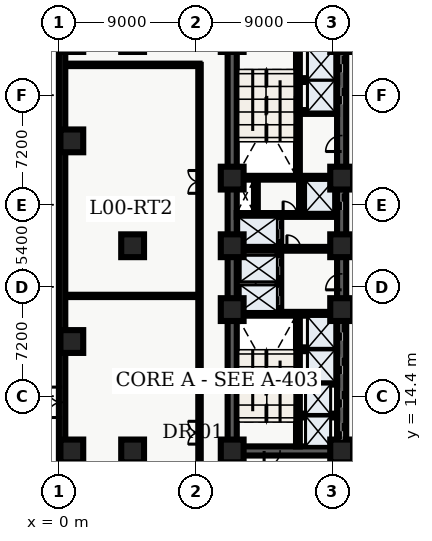
"""IFC4 building model, lengths in metres.
Left out: names, types, materials, properties, quantities, classifications, styles, units other than length and angle.
Written with IfcOpenShell. Run it as: python <this file> out.ifc"""

import sys

from ifc_helpers import new_model, entity, si_unit, converted_unit, direction, frame, origin_with_axes, origin_2d_with_axis, place, context, subcontext, project, spatial, polyline, rectangle, outline, extrude, element, fill, save


model = new_model("IFC4")
c1 = context("Model", 3, precision=1e-05, world=origin_with_axes(), true_north=direction((0.0, 1.0)))
c2 = subcontext(c1, "Body", "Model", "MODEL_VIEW")
j1 = project(units=[si_unit("LENGTHUNIT", "METRE"), converted_unit("PLANEANGLEUNIT", "DEGREE", entity("IfcPlaneAngleMeasure", 0.017), si_unit("PLANEANGLEUNIT", "RADIAN"), dimensions=[0, 0, 0, 0, 0, 0, 0])], contexts=[c1])
p1 = place(None, origin_with_axes())
s1 = spatial("IfcSite", under=j1, at=p1, CompositionType="ELEMENT")
p2 = place(p1, origin_with_axes())
s2 = spatial("IfcBuilding", under=s1, at=p2, CompositionType="ELEMENT")
p3 = place(p2, origin_with_axes())
s3 = spatial("IfcBuildingStorey", under=s2, at=p3, CompositionType="ELEMENT", Elevation=0.0)
p4 = place(p3, frame((11.4, 10.8, 0.0), z_axis=(0.0, 0.0, 1.0), x_axis=(0.0, 1.0, 0.0)))
e1 = element("IfcWall", 1, at=p4, inside=s3, PredefinedType="SHEAR", context=c2, shape_type="SweptSolid", body=[
    extrude(outline(polyline([(0.0, -0.3), (27.0, -0.3), (27.0, 0.3), (0.0, 0.3), (0.0, -0.3)])), origin_with_axes(), (0.0, 0.0, 1.0), 5.46),
])
p5 = place(p3, frame((18.6, 10.8, 0.0), z_axis=(0.0, 0.0, 1.0), x_axis=(-1.0, 0.0, 0.0)))
e2 = element("IfcWall", 2, at=p5, inside=s3, PredefinedType="SHEAR", context=c2, shape_type="SweptSolid", body=[
    extrude(outline(polyline([(0.0, -0.3), (7.2, -0.3), (7.2, 0.3), (0.0, 0.3), (0.0, -0.3)])), origin_with_axes(), (0.0, 0.0, 1.0), 5.46),
])
p6 = place(p5, frame((4.575, 0.0, 0.0), z_axis=(0.0, 0.0, 1.0), x_axis=(1.0, 0.0, 0.0)))
e3 = element("IfcOpeningElement", 3, at=p6, cuts=e2, PredefinedType="OPENING", context=c2, shape_type="SweptSolid", body=[
    extrude(rectangle(XDim=1.05, YDim=0.62, at=origin_2d_with_axis()), origin_with_axes(), (0.0, 0.0, 1.0), 2.15),
])
p7 = place(p3, frame((18.6, 10.8, 0.0), z_axis=(0.0, 0.0, 1.0), x_axis=(0.0, 1.0, 0.0)))
e4 = element("IfcWall", 4, at=p7, inside=s3, PredefinedType="SHEAR", context=c2, shape_type="SweptSolid", body=[
    extrude(outline(polyline([(0.0, -0.3), (13.5, -0.3), (13.5, 0.3), (0.0, 0.3), (0.0, -0.3)])), origin_with_axes(), (0.0, 0.0, 1.0), 5.46),
])
p8 = place(p7, frame((1.3, 0.0, 0.0), z_axis=(0.0, 0.0, 1.0), x_axis=(1.0, 0.0, 0.0)))
e5 = element("IfcOpeningElement", 5, at=p8, cuts=e4, PredefinedType="OPENING", context=c2, shape_type="SweptSolid", body=[
    extrude(rectangle(XDim=1.1, YDim=0.62, at=origin_2d_with_axis()), origin_with_axes(), (0.0, 0.0, 1.0), 2.15),
])
p9 = place(p7, frame((3.4, 0.0, 0.0), z_axis=(0.0, 0.0, 1.0), x_axis=(1.0, 0.0, 0.0)))
e6 = element("IfcOpeningElement", 6, at=p9, cuts=e4, PredefinedType="OPENING", context=c2, shape_type="SweptSolid", body=[
    extrude(rectangle(XDim=1.1, YDim=0.62, at=origin_2d_with_axis()), origin_with_axes(), (0.0, 0.0, 1.0), 2.15),
])
p10 = place(p7, frame((5.6, 0.0, 0.0), z_axis=(0.0, 0.0, 1.0), x_axis=(1.0, 0.0, 0.0)))
e7 = element("IfcOpeningElement", 7, at=p10, cuts=e4, PredefinedType="OPENING", context=c2, shape_type="SweptSolid", body=[
    extrude(rectangle(XDim=1.1, YDim=0.62, at=origin_2d_with_axis()), origin_with_axes(), (0.0, 0.0, 1.0), 2.15),
])
p11 = place(p7, frame((7.8, 0.0, 0.0), z_axis=(0.0, 0.0, 1.0), x_axis=(1.0, 0.0, 0.0)))
e8 = element("IfcOpeningElement", 8, at=p11, cuts=e4, PredefinedType="OPENING", context=c2, shape_type="SweptSolid", body=[
    extrude(rectangle(XDim=1.1, YDim=0.62, at=origin_2d_with_axis()), origin_with_axes(), (0.0, 0.0, 1.0), 2.15),
])
p12 = place(p7, frame((11.125, 0.0, 0.0), z_axis=(0.0, 0.0, 1.0), x_axis=(1.0, 0.0, 0.0)))
e9 = element("IfcOpeningElement", 9, at=p12, cuts=e4, PredefinedType="OPENING", context=c2, shape_type="SweptSolid", body=[
    extrude(rectangle(XDim=1.05, YDim=0.62, at=origin_2d_with_axis()), origin_with_axes(), (0.0, 0.0, 1.0), 2.15),
])
p13 = place(p3, frame((18.6, 24.3, 0.0), z_axis=(0.0, 0.0, 1.0), x_axis=(0.0, 1.0, 0.0)))
e10 = element("IfcWall", 10, at=p13, inside=s3, PredefinedType="SHEAR", context=c2, shape_type="SweptSolid", body=[
    extrude(outline(polyline([(0.0, -0.3), (13.5, -0.3), (13.5, 0.3), (0.0, 0.3), (0.0, -0.3)])), origin_with_axes(), (0.0, 0.0, 1.0), 5.46),
])
p14 = place(p13, frame((9.85, 0.0, 0.0), z_axis=(0.0, 0.0, 1.0), x_axis=(1.0, 0.0, 0.0)))
e11 = element("IfcOpeningElement", 11, at=p14, cuts=e10, PredefinedType="OPENING", context=c2, shape_type="SweptSolid", body=[
    extrude(rectangle(XDim=1.1, YDim=0.62, at=origin_2d_with_axis()), origin_with_axes(), (0.0, 0.0, 1.0), 2.15),
])
p15 = place(p13, frame((11.95, 0.0, 0.0), z_axis=(0.0, 0.0, 1.0), x_axis=(1.0, 0.0, 0.0)))
e12 = element("IfcOpeningElement", 12, at=p15, cuts=e10, PredefinedType="OPENING", context=c2, shape_type="SweptSolid", body=[
    extrude(rectangle(XDim=1.1, YDim=0.62, at=origin_2d_with_axis()), origin_with_axes(), (0.0, 0.0, 1.0), 2.15),
])
p16 = place(p13, frame((2.9, 0.0, 0.0), z_axis=(0.0, 0.0, 1.0), x_axis=(1.0, 0.0, 0.0)))
e13 = element("IfcOpeningElement", 13, at=p16, cuts=e10, PredefinedType="OPENING", context=c2, shape_type="SweptSolid", body=[
    extrude(rectangle(XDim=1.1, YDim=0.62, at=origin_2d_with_axis()), origin_with_axes(), (0.0, 0.0, 1.0), 2.15),
])
p17 = place(p13, frame((6.725, 0.0, 0.0), z_axis=(0.0, 0.0, 1.0), x_axis=(1.0, 0.0, 0.0)))
e14 = element("IfcOpeningElement", 14, at=p17, cuts=e10, PredefinedType="OPENING", context=c2, shape_type="SweptSolid", body=[
    extrude(rectangle(XDim=1.05, YDim=0.62, at=origin_2d_with_axis()), origin_with_axes(), (0.0, 0.0, 1.0), 2.15),
])
p18 = place(p3, frame((15.725, 11.1, 0.0), z_axis=(0.0, 0.0, 1.0), x_axis=(0.0, 1.0, 0.0)))
e15 = element("IfcWall", 15, at=p18, inside=s3, PredefinedType="SHEAR", context=c2, shape_type="SweptSolid", body=[
    extrude(outline(polyline([(0.0, -0.125), (8.6, -0.125), (8.6, 0.125), (0.0, 0.125), (0.0, -0.125)])), origin_with_axes(), (0.0, 0.0, 1.0), 5.46),
])
p19 = place(p3, frame((11.7, 19.825, 0.0), z_axis=(0.0, 0.0, 1.0), x_axis=(1.0, 0.0, 0.0)))
e16 = element("IfcWall", 16, at=p19, inside=s3, PredefinedType="SHEAR", context=c2, shape_type="SweptSolid", body=[
    extrude(outline(polyline([(0.0, -0.125), (6.6, -0.125), (6.6, 0.125), (0.0, 0.125), (0.0, -0.125)])), origin_with_axes(), (0.0, 0.0, 1.0), 5.46),
])
p20 = place(p3, frame((15.725, 28.9, 0.0), z_axis=(0.0, 0.0, 1.0), x_axis=(0.0, 1.0, 0.0)))
e17 = element("IfcWall", 17, at=p20, inside=s3, PredefinedType="SHEAR", context=c2, shape_type="SweptSolid", body=[
    extrude(outline(polyline([(0.0, -0.125), (8.6, -0.125), (8.6, 0.125), (0.0, 0.125), (0.0, -0.125)])), origin_with_axes(), (0.0, 0.0, 1.0), 5.46),
])
p21 = place(p3, frame((11.7, 28.775, 0.0), z_axis=(0.0, 0.0, 1.0), x_axis=(1.0, 0.0, 0.0)))
e18 = element("IfcWall", 18, at=p21, inside=s3, PredefinedType="SHEAR", context=c2, shape_type="SweptSolid", body=[
    extrude(outline(polyline([(0.0, -0.125), (6.6, -0.125), (6.6, 0.125), (0.0, 0.125), (0.0, -0.125)])), origin_with_axes(), (0.0, 0.0, 1.0), 5.46),
])
p22 = place(p3, frame((14.5, 19.95, 0.0), z_axis=(0.0, 0.0, 1.0), x_axis=(0.0, 1.0, 0.0)))
e19 = element("IfcWall", 19, at=p22, inside=s3, PredefinedType="SOLIDWALL", context=c2, shape_type="SweptSolid", body=[
    extrude(outline(polyline([(0.0, -0.125), (6.25, -0.125), (6.25, 0.125), (0.0, 0.125), (0.0, -0.125)])), origin_with_axes(), (0.0, 0.0, 1.0), 3.6),
])
p23 = place(p22, frame((1.025, 0.0, 0.0), z_axis=(0.0, 0.0, 1.0), x_axis=(1.0, 0.0, 0.0)))
e20 = element("IfcOpeningElement", 20, at=p23, cuts=e19, PredefinedType="OPENING", context=c2, shape_type="SweptSolid", body=[
    extrude(rectangle(XDim=1.1, YDim=0.27, at=origin_2d_with_axis()), origin_with_axes(), (0.0, 0.0, 1.0), 2.15),
])
p24 = place(p22, frame((2.975, 0.0, 0.0), z_axis=(0.0, 0.0, 1.0), x_axis=(1.0, 0.0, 0.0)))
e21 = element("IfcOpeningElement", 21, at=p24, cuts=e19, PredefinedType="OPENING", context=c2, shape_type="SweptSolid", body=[
    extrude(rectangle(XDim=1.1, YDim=0.27, at=origin_2d_with_axis()), origin_with_axes(), (0.0, 0.0, 1.0), 2.15),
])
p25 = place(p22, frame((5.425, 0.0, 0.0), z_axis=(0.0, 0.0, 1.0), x_axis=(1.0, 0.0, 0.0)))
e22 = element("IfcOpeningElement", 22, at=p25, cuts=e19, PredefinedType="OPENING", context=c2, shape_type="SweptSolid", body=[
    extrude(rectangle(XDim=1.2, YDim=0.27, at=origin_2d_with_axis()), origin_with_axes(), (0.0, 0.0, 1.0), 2.15),
])
p26 = place(p3, frame((11.7, 24.1, 0.0), z_axis=(0.0, 0.0, 1.0), x_axis=(1.0, 0.0, 0.0)))
e23 = element("IfcWall", 23, at=p26, inside=s3, PredefinedType="SOLIDWALL", context=c2, shape_type="SweptSolid", body=[
    extrude(outline(polyline([(0.0, -0.125), (6.6, -0.125), (6.6, 0.125), (0.0, 0.125), (0.0, -0.125)])), origin_with_axes(), (0.0, 0.0, 1.0), 3.6),
])
p27 = place(p26, frame((3.75, 0.0, 0.0), z_axis=(0.0, 0.0, 1.0), x_axis=(1.0, 0.0, 0.0)))
e24 = element("IfcOpeningElement", 24, at=p27, cuts=e23, PredefinedType="OPENING", context=c2, shape_type="SweptSolid", body=[
    extrude(rectangle(XDim=0.9, YDim=0.27, at=origin_2d_with_axis()), origin_with_axes(), (0.0, 0.0, 1.0), 2.15),
])
p28 = place(p3, frame((11.7, 26.325, 0.0), z_axis=(0.0, 0.0, 1.0), x_axis=(1.0, 0.0, 0.0)))
e25 = element("IfcWall", 25, at=p28, inside=s3, PredefinedType="SOLIDWALL", context=c2, shape_type="SweptSolid", body=[
    extrude(outline(polyline([(0.0, -0.125), (6.6, -0.125), (6.6, 0.125), (0.0, 0.125), (0.0, -0.125)])), origin_with_axes(), (0.0, 0.0, 1.0), 3.6),
])
p29 = place(p28, frame((3.5, 0.0, 0.0), z_axis=(0.0, 0.0, 1.0), x_axis=(1.0, 0.0, 0.0)))
e26 = element("IfcOpeningElement", 26, at=p29, cuts=e25, PredefinedType="OPENING", context=c2, shape_type="SweptSolid", body=[
    extrude(rectangle(XDim=0.9, YDim=0.27, at=origin_2d_with_axis()), origin_with_axes(), (0.0, 0.0, 1.0), 2.15),
])
for number, where, z_axis, x_axis in (
    (27, (12.96, 26.45, 0.0), (0.0, 0.0, 1.0), (0.0, 1.0, 0.0)),
    (28, (15.925, 26.45, 0.0), (0.0, 0.0, 1.0), (0.0, 1.0, 0.0)),
):
    element("IfcWall", number, at=place(p3, frame(where, z_axis=z_axis, x_axis=x_axis)), inside=s3, PredefinedType="SOLIDWALL", context=c2, shape_type="SweptSolid", body=[
        extrude(outline(polyline([(0.0, -0.125), (2.2, -0.125), (2.2, 0.125), (0.0, 0.125), (0.0, -0.125)])), origin_with_axes(), (0.0, 0.0, 1.0), 3.6),
    ])
for number, where, z_axis, x_axis in (
    (29, (11.4, 10.8, 0.0), (0.0, 0.0, 1.0), (1.0, 0.0, 0.0)),
    (30, (11.4, 20.1, 0.0), (0.0, 0.0, 1.0), (1.0, 0.0, 0.0)),
    (31, (11.4, 24.3, 0.0), (0.0, 0.0, 1.0), (1.0, 0.0, 0.0)),
    (32, (11.4, 28.75, 0.0), (0.0, 0.0, 1.0), (1.0, 0.0, 0.0)),
    (33, (18.6, 10.8, 0.0), (0.0, 0.0, 1.0), (1.0, 0.0, 0.0)),
    (34, (18.6, 20.1, 0.0), (0.0, 0.0, 1.0), (1.0, 0.0, 0.0)),
    (35, (18.6, 24.3, 0.0), (0.0, 0.0, 1.0), (1.0, 0.0, 0.0)),
    (36, (18.6, 28.75, 0.0), (0.0, 0.0, 1.0), (1.0, 0.0, 0.0)),
    (37, (4.85, 10.8, 0.0), (0.0, 0.0, 1.0), (1.0, 0.0, 0.0)),
    (38, (4.85, 24.3, 0.0), (0.0, 0.0, 1.0), (1.0, 0.0, 0.0)),
    (39, (0.85, 10.8, 0.0), (0.0, 0.0, 1.0), (1.0, 0.0, 0.0)),
    (40, (0.85, 18.0, 0.0), (0.0, 0.0, 1.0), (1.0, 0.0, 0.0)),
    (41, (0.85, 31.2, 0.0), (0.0, 0.0, 1.0), (1.0, 0.0, 0.0)),
):
    element("IfcColumn", number, at=place(p3, frame(where, z_axis=z_axis, x_axis=x_axis)), inside=s3, PredefinedType="COLUMN", context=c2, shape_type="SweptSolid", body=[
        extrude(rectangle(XDim=1.5, YDim=1.5, at=origin_2d_with_axis()), origin_with_axes(), (0.0, 0.0, 1.0), 5.7),
    ])
for number, where, z_axis, x_axis in (
    (42, (15.84, 13.13, 0.0), (0.0, 0.0, 1.0), (1.0, 0.0, 0.0)),
    (43, (15.84, 15.29, 0.0), (0.0, 0.0, 1.0), (1.0, 0.0, 0.0)),
    (44, (15.84, 17.49, 0.0), (0.0, 0.0, 1.0), (1.0, 0.0, 0.0)),
    (45, (15.84, 33.1, 0.0), (0.0, 0.0, 1.0), (1.0, 0.0, 0.0)),
    (46, (15.84, 35.2, 0.0), (0.0, 0.0, 1.0), (1.0, 0.0, 0.0)),
):
    element("IfcWall", number, at=place(p3, frame(where, z_axis=z_axis, x_axis=x_axis)), inside=s3, PredefinedType="SOLIDWALL", context=c2, shape_type="SweptSolid", body=[
        extrude(outline(polyline([(0.0, -0.125), (2.46, -0.125), (2.46, 0.125), (0.0, 0.125), (0.0, -0.125)])), origin_with_axes(), (0.0, 0.0, 1.0), 3.2),
    ])
p30 = place(p3, frame((9.25, 5.75, 0.0), z_axis=(0.0, 0.0, 1.0), x_axis=(0.0, 1.0, 0.0)))
e47 = element("IfcWall", 47, at=p30, inside=s3, PredefinedType="PARTITIONING", context=c2, shape_type="SweptSolid", body=[
    extrude(outline(polyline([(0.0, -0.08), (30.45, -0.08), (30.45, 0.08), (0.0, 0.08), (0.0, -0.08)])), origin_with_axes(), (0.0, 0.0, 1.0), 3.2),
])
p31 = place(p30, frame((6.25, 0.0, 0.0), z_axis=(0.0, 0.0, 1.0), x_axis=(1.0, 0.0, 0.0)))
e48 = element("IfcOpeningElement", 48, at=p31, cuts=e47, PredefinedType="OPENING", context=c2, shape_type="SweptSolid", body=[
    extrude(rectangle(XDim=1.5, YDim=0.18, at=origin_2d_with_axis()), origin_with_axes(), (0.0, 0.0, 1.0), 2.2),
])
p32 = place(p30, frame((22.75, 0.0, 0.0), z_axis=(0.0, 0.0, 1.0), x_axis=(1.0, 0.0, 0.0)))
e49 = element("IfcOpeningElement", 49, at=p32, cuts=e47, PredefinedType="OPENING", context=c2, shape_type="SweptSolid", body=[
    extrude(rectangle(XDim=1.5, YDim=0.18, at=origin_2d_with_axis()), origin_with_axes(), (0.0, 0.0, 1.0), 2.2),
])
p33 = place(p3, frame((0.42, 36.2, 0.0), z_axis=(0.0, 0.0, 1.0), x_axis=(1.0, 0.0, 0.0)))
e50 = element("IfcWall", 50, at=p33, inside=s3, PredefinedType="PARTITIONING", context=c2, shape_type="SweptSolid", body=[
    extrude(outline(polyline([(0.0, -0.08), (8.83, -0.08), (8.83, 0.08), (0.0, 0.08), (0.0, -0.08)])), origin_with_axes(), (0.0, 0.0, 1.0), 3.2),
])
p34 = place(p3, frame((0.42, 21.0, 0.0), z_axis=(0.0, 0.0, 1.0), x_axis=(1.0, 0.0, 0.0)))
e51 = element("IfcWall", 51, at=p34, inside=s3, PredefinedType="PARTITIONING", context=c2, shape_type="SweptSolid", body=[
    extrude(outline(polyline([(0.0, -0.075), (8.83, -0.075), (8.83, 0.075), (0.0, 0.075), (0.0, -0.075)])), origin_with_axes(), (0.0, 0.0, 1.0), 3.2),
])
p35 = place(p3, frame((0.21, 0.42, 0.0), z_axis=(0.0, 0.0, 1.0), x_axis=(0.0, 1.0, 0.0)))
e52 = element("IfcWall", 52, at=p35, inside=s3, PredefinedType="SOLIDWALL", context=c2, shape_type="SweptSolid", body=[
    extrude(outline(polyline([(0.0, -0.21), (49.08, -0.21), (49.08, 0.21), (0.0, 0.21), (0.0, -0.21)])), origin_with_axes(), (0.0, 0.0, 1.0), 5.46),
])
p36 = place(p35, frame((39.06, 0.0, 0.0), z_axis=(0.0, 0.0, 1.0), x_axis=(1.0, 0.0, 0.0)))
e53 = element("IfcOpeningElement", 53, at=p36, cuts=e52, PredefinedType="OPENING", context=c2, shape_type="SweptSolid", body=[
    extrude(rectangle(XDim=1.8, YDim=0.44, at=origin_2d_with_axis()), origin_with_axes(), (0.0, 0.0, 1.0), 2.2),
])
p37 = place(p35, frame((13.58, 0.0, 0.0), z_axis=(0.0, 0.0, 1.0), x_axis=(1.0, 0.0, 0.0)))
e54 = element("IfcOpeningElement", 54, at=p37, cuts=e52, PredefinedType="OPENING", context=c2, shape_type="SweptSolid", body=[
    extrude(rectangle(XDim=2.0, YDim=0.44, at=origin_2d_with_axis()), origin_with_axes(), (0.0, 0.0, 1.0), 2.4),
])
p38 = place(p7, frame((1.3, 0.0, 0.0), z_axis=(0.0, 0.0, 1.0), x_axis=(1.0, 0.0, 0.0)))
e55 = element("IfcDoor", 55, at=p38, inside=s3, OperationType="SLIDING_TO_LEFT", PredefinedType="DOOR", context=c2, shape_type="SweptSolid", body=[
    extrude(rectangle(XDim=1.1, YDim=0.09, at=origin_2d_with_axis()), origin_with_axes(), (0.0, 0.0, 1.0), 2.15),
])
fill(e5, e55)
p39 = place(p7, frame((3.4, 0.0, 0.0), z_axis=(0.0, 0.0, 1.0), x_axis=(1.0, 0.0, 0.0)))
e56 = element("IfcDoor", 56, at=p39, inside=s3, OperationType="SLIDING_TO_RIGHT", PredefinedType="DOOR", context=c2, shape_type="SweptSolid", body=[
    extrude(rectangle(XDim=1.1, YDim=0.09, at=origin_2d_with_axis()), origin_with_axes(), (0.0, 0.0, 1.0), 2.15),
])
fill(e6, e56)
p40 = place(p7, frame((5.6, 0.0, 0.0), z_axis=(0.0, 0.0, 1.0), x_axis=(1.0, 0.0, 0.0)))
e57 = element("IfcDoor", 57, at=p40, inside=s3, OperationType="DOUBLE_DOOR_SLIDING", PredefinedType="DOOR", context=c2, shape_type="SweptSolid", body=[
    extrude(rectangle(XDim=1.1, YDim=0.09, at=origin_2d_with_axis()), origin_with_axes(), (0.0, 0.0, 1.0), 2.15),
])
fill(e7, e57)
p41 = place(p7, frame((7.8, 0.0, 0.0), z_axis=(0.0, 0.0, 1.0), x_axis=(1.0, 0.0, 0.0)))
e58 = element("IfcDoor", 58, at=p41, inside=s3, OperationType="DOUBLE_DOOR_SLIDING", PredefinedType="DOOR", context=c2, shape_type="SweptSolid", body=[
    extrude(rectangle(XDim=1.1, YDim=0.09, at=origin_2d_with_axis()), origin_with_axes(), (0.0, 0.0, 1.0), 2.15),
])
fill(e8, e58)
p42 = place(p13, frame((9.85, 0.0, 0.0), z_axis=(0.0, 0.0, 1.0), x_axis=(1.0, 0.0, 0.0)))
e59 = element("IfcDoor", 59, at=p42, inside=s3, OperationType="DOUBLE_DOOR_SLIDING", PredefinedType="DOOR", context=c2, shape_type="SweptSolid", body=[
    extrude(rectangle(XDim=1.1, YDim=0.09, at=origin_2d_with_axis()), origin_with_axes(), (0.0, 0.0, 1.0), 2.15),
])
fill(e11, e59)
p43 = place(p13, frame((11.95, 0.0, 0.0), z_axis=(0.0, 0.0, 1.0), x_axis=(1.0, 0.0, 0.0)))
e60 = element("IfcDoor", 60, at=p43, inside=s3, OperationType="DOUBLE_DOOR_SLIDING", PredefinedType="DOOR", context=c2, shape_type="SweptSolid", body=[
    extrude(rectangle(XDim=1.1, YDim=0.09, at=origin_2d_with_axis()), origin_with_axes(), (0.0, 0.0, 1.0), 2.15),
])
fill(e12, e60)
p44 = place(p13, frame((2.9, 0.0, 0.0), z_axis=(0.0, 0.0, 1.0), x_axis=(1.0, 0.0, 0.0)))
e61 = element("IfcDoor", 61, at=p44, inside=s3, OperationType="DOUBLE_DOOR_SLIDING", PredefinedType="DOOR", context=c2, shape_type="SweptSolid", body=[
    extrude(rectangle(XDim=1.1, YDim=0.09, at=origin_2d_with_axis()), origin_with_axes(), (0.0, 0.0, 1.0), 2.15),
])
fill(e13, e61)
p45 = place(p22, frame((1.025, 0.0, 0.0), z_axis=(0.0, 0.0, 1.0), x_axis=(1.0, 0.0, 0.0)))
e62 = element("IfcDoor", 62, at=p45, inside=s3, OperationType="SLIDING_TO_LEFT", PredefinedType="DOOR", context=c2, shape_type="SweptSolid", body=[
    extrude(rectangle(XDim=1.1, YDim=0.09, at=origin_2d_with_axis()), origin_with_axes(), (0.0, 0.0, 1.0), 2.15),
])
fill(e20, e62)
p46 = place(p22, frame((2.975, 0.0, 0.0), z_axis=(0.0, 0.0, 1.0), x_axis=(1.0, 0.0, 0.0)))
e63 = element("IfcDoor", 63, at=p46, inside=s3, OperationType="SLIDING_TO_RIGHT", PredefinedType="DOOR", context=c2, shape_type="SweptSolid", body=[
    extrude(rectangle(XDim=1.1, YDim=0.09, at=origin_2d_with_axis()), origin_with_axes(), (0.0, 0.0, 1.0), 2.15),
])
fill(e21, e63)
p47 = place(p22, frame((5.425, 0.0, 0.0), z_axis=(0.0, 0.0, 1.0), x_axis=(1.0, 0.0, 0.0)))
e64 = element("IfcDoor", 64, at=p47, inside=s3, OperationType="DOUBLE_DOOR_SLIDING", PredefinedType="DOOR", context=c2, shape_type="SweptSolid", body=[
    extrude(rectangle(XDim=1.2, YDim=0.09, at=origin_2d_with_axis()), origin_with_axes(), (0.0, 0.0, 1.0), 2.15),
])
fill(e22, e64)
p48 = place(p5, frame((4.575, 0.0, 0.0), z_axis=(0.0, 0.0, 1.0), x_axis=(1.0, 0.0, 0.0)))
e65 = element("IfcDoor", 65, at=p48, inside=s3, OperationType="SINGLE_SWING_RIGHT", PredefinedType="DOOR", context=c2, shape_type="SweptSolid", body=[
    extrude(rectangle(XDim=1.05, YDim=0.09, at=origin_2d_with_axis()), origin_with_axes(), (0.0, 0.0, 1.0), 2.15),
])
fill(e3, e65)
p49 = place(p7, frame((11.125, 0.0, 0.0), z_axis=(0.0, 0.0, 1.0), x_axis=(1.0, 0.0, 0.0)))
e66 = element("IfcDoor", 66, at=p49, inside=s3, OperationType="SINGLE_SWING_LEFT", PredefinedType="DOOR", context=c2, shape_type="SweptSolid", body=[
    extrude(rectangle(XDim=1.05, YDim=0.09, at=origin_2d_with_axis()), origin_with_axes(), (0.0, 0.0, 1.0), 2.15),
])
fill(e9, e66)
p50 = place(p26, frame((3.75, 0.0, 0.0), z_axis=(0.0, 0.0, 1.0), x_axis=(1.0, 0.0, 0.0)))
e67 = element("IfcDoor", 67, at=p50, inside=s3, OperationType="SINGLE_SWING_LEFT", PredefinedType="DOOR", context=c2, shape_type="SweptSolid", body=[
    extrude(rectangle(XDim=0.9, YDim=0.09, at=origin_2d_with_axis()), origin_with_axes(), (0.0, 0.0, 1.0), 2.15),
])
fill(e24, e67)
p51 = place(p28, frame((3.5, 0.0, 0.0), z_axis=(0.0, 0.0, 1.0), x_axis=(1.0, 0.0, 0.0)))
e68 = element("IfcDoor", 68, at=p51, inside=s3, OperationType="SINGLE_SWING_LEFT", PredefinedType="DOOR", context=c2, shape_type="SweptSolid", body=[
    extrude(rectangle(XDim=0.9, YDim=0.09, at=origin_2d_with_axis()), origin_with_axes(), (0.0, 0.0, 1.0), 2.15),
])
fill(e26, e68)
p52 = place(p13, frame((6.725, 0.0, 0.0), z_axis=(0.0, 0.0, 1.0), x_axis=(1.0, 0.0, 0.0)))
e69 = element("IfcDoor", 69, at=p52, inside=s3, OperationType="SINGLE_SWING_LEFT", PredefinedType="DOOR", context=c2, shape_type="SweptSolid", body=[
    extrude(rectangle(XDim=1.05, YDim=0.09, at=origin_2d_with_axis()), origin_with_axes(), (0.0, 0.0, 1.0), 2.15),
])
fill(e14, e69)
p53 = place(p30, frame((6.25, 0.0, 0.0), z_axis=(0.0, 0.0, 1.0), x_axis=(1.0, 0.0, 0.0)))
e70 = element("IfcDoor", 70, at=p53, inside=s3, OperationType="DOUBLE_DOOR_SINGLE_SWING", PredefinedType="DOOR", context=c2, shape_type="SweptSolid", body=[
    extrude(rectangle(XDim=1.5, YDim=0.09, at=origin_2d_with_axis()), origin_with_axes(), (0.0, 0.0, 1.0), 2.2),
])
fill(e48, e70)
p54 = place(p30, frame((22.75, 0.0, 0.0), z_axis=(0.0, 0.0, 1.0), x_axis=(1.0, 0.0, 0.0)))
e71 = element("IfcDoor", 71, at=p54, inside=s3, OperationType="DOUBLE_DOOR_SINGLE_SWING", PredefinedType="DOOR", context=c2, shape_type="SweptSolid", body=[
    extrude(rectangle(XDim=1.5, YDim=0.09, at=origin_2d_with_axis()), origin_with_axes(), (0.0, 0.0, 1.0), 2.2),
])
fill(e49, e71)
p55 = place(p35, frame((13.58, 0.0, 0.0), z_axis=(0.0, 0.0, 1.0), x_axis=(1.0, 0.0, 0.0)))
e72 = element("IfcDoor", 72, at=p55, inside=s3, OperationType="DOUBLE_DOOR_SINGLE_SWING", PredefinedType="DOOR", context=c2, shape_type="SweptSolid", body=[
    extrude(rectangle(XDim=2.0, YDim=0.09, at=origin_2d_with_axis()), origin_with_axes(), (0.0, 0.0, 1.0), 2.4),
])
fill(e54, e72)
save(model, sys.argv[1])
